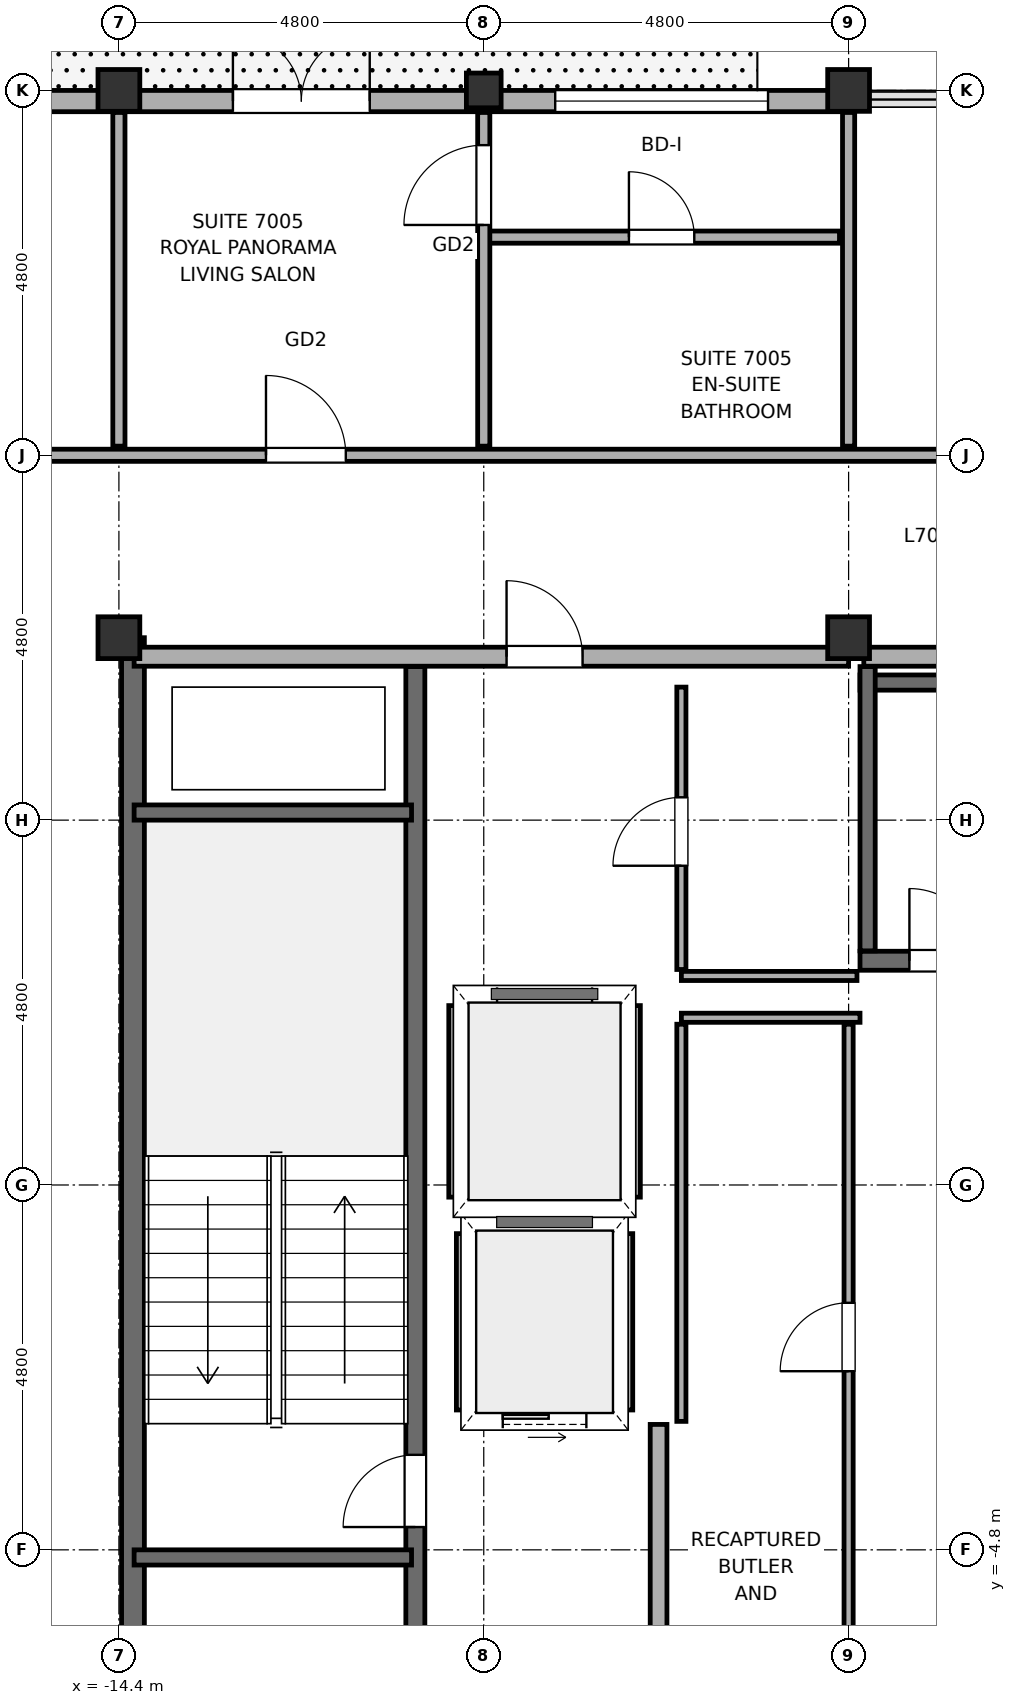
"""IFC4 building model, lengths in metres.
Left out: names, types, materials, properties, quantities, classifications, styles, units other than length and angle.
Written with IfcOpenShell. Run it as: python <this file> out.ifc"""

import sys

from ifc_helpers import new_model, si_unit, direction, frame, frame_2d, origin, origin_2d, place, context, subcontext, project, spatial, rectangle, hollow_rectangle, hollow_circle, extrude, element, fill, save


model = new_model("IFC4")
c1 = context("Model", 3, precision=1e-05, world=origin(), true_north=direction((0.0, 1.0)))
c2 = subcontext(c1, "Body", "Model", "MODEL_VIEW")
j1 = project(units=[si_unit("LENGTHUNIT", "METRE"), si_unit("PLANEANGLEUNIT", "RADIAN")], contexts=[c1])
p1 = place(None, origin())
s1 = spatial("IfcSite", under=j1, at=p1, CompositionType="ELEMENT")
p2 = place(p1, origin())
s2 = spatial("IfcBuilding", under=s1, at=p2, CompositionType="ELEMENT")
p3 = place(p2, frame((0.0, 0.0, 282.2)))
s3 = spatial("IfcBuildingStorey", under=s2, at=p3, CompositionType="ELEMENT", Elevation=282.2)
for number, where, z_axis, x_axis in (
    (1, (-14.4, 7.2, 0.0), (0.0, 0.0, 1.0), (1.0, 0.0, 0.0)),
    (2, (-14.4, 14.4, 0.0), (0.0, 0.0, 1.0), (1.0, 0.0, 0.0)),
):
    element("IfcColumn", number, at=place(p3, frame(where, z_axis=z_axis, x_axis=x_axis)), inside=s3, PredefinedType="COLUMN", context=c2, shape_type="SweptSolid", body=[
        extrude(hollow_rectangle(XDim=0.55, YDim=0.55, WallThickness=0.025, at=origin_2d()), origin(), (0.0, 0.0, 1.0), 4.2),
    ])
p4 = place(p3, frame((-9.6, 14.4, -0.2), z_axis=(0.0, 0.0, 1.0), x_axis=(1.0, 0.0, 0.0)))
e3 = element("IfcColumn", 3, at=p4, inside=s3, PredefinedType="COLUMN", context=c2, shape_type="SweptSolid", body=[
    extrude(hollow_circle(Radius=0.229, WallThickness=0.02, at=origin_2d()), origin(), (0.0, 0.0, 1.0), 4.4),
])
for number, where, z_axis, x_axis in (
    (4, (-4.8, 7.2, 0.0), (0.0, 0.0, 1.0), (1.0, 0.0, 0.0)),
    (5, (-4.8, 14.4, 0.0), (0.0, 0.0, 1.0), (1.0, 0.0, 0.0)),
):
    element("IfcColumn", number, at=place(p3, frame(where, z_axis=z_axis, x_axis=x_axis)), inside=s3, PredefinedType="COLUMN", context=c2, shape_type="SweptSolid", body=[
        extrude(hollow_rectangle(XDim=0.55, YDim=0.55, WallThickness=0.025, at=origin_2d()), origin(), (0.0, 0.0, 1.0), 4.2),
    ])
p5 = place(p3, frame((-14.215, -7.2, -0.2), z_axis=(0.0, 0.0, 1.0), x_axis=(0.0, 1.0, 0.0)))
e6 = element("IfcWall", 6, at=p5, inside=s3, PredefinedType="SHEAR", context=c2, shape_type="SweptSolid", body=[
    extrude(rectangle(XDim=14.4, YDim=0.3, at=frame_2d((7.2, 0.0))), origin(), (0.0, 0.0, 1.0), 4.2),
])
p6 = place(p3, frame((-25.2, 14.26, 0.0), z_axis=(0.0, 0.0, 1.0), x_axis=(1.0, 0.0, 0.0)))
e7 = element("IfcWall", 7, at=p6, inside=s3, PredefinedType="SOLIDWALL", context=c2, shape_type="SweptSolid", body=[
    extrude(rectangle(XDim=20.45, YDim=0.28, at=frame_2d((10.225, 0.0))), origin(), (0.0, 0.0, 1.0), 2.6),
])
p7 = place(p6, frame((12.3, 0.0, 0.0)))
e8 = element("IfcOpeningElement", 8, at=p7, cuts=e7, PredefinedType="OPENING", context=c2, shape_type="SweptSolid", body=[
    extrude(rectangle(XDim=1.8, YDim=2.2, at=frame_2d((0.9, 1.1))), frame((0.0, 0.155, 0.0), z_axis=(0.0, -1.0, 0.0), x_axis=(1.0, 0.0, 0.0)), (0.0, 0.0, 1.0), 0.31),
])
p8 = place(p6, frame((16.54, 0.0, 0.75)))
e9 = element("IfcOpeningElement", 9, at=p8, cuts=e7, PredefinedType="OPENING", context=c2, shape_type="SweptSolid", body=[
    extrude(rectangle(XDim=2.8, YDim=1.7, at=frame_2d((1.4, 0.85))), frame((0.0, 0.155, 0.0), z_axis=(0.0, -1.0, 0.0), x_axis=(1.0, 0.0, 0.0)), (0.0, 0.0, 1.0), 0.31),
])
p9 = place(p3, frame((-14.2, 6.95, 0.0), z_axis=(0.0, 0.0, 1.0), x_axis=(1.0, 0.0, 0.0)))
e10 = element("IfcWall", 10, at=p9, inside=s3, PredefinedType="SOLIDWALL", context=c2, shape_type="SweptSolid", body=[
    extrude(rectangle(XDim=9.4, YDim=0.25, at=frame_2d((4.7, 0.0))), origin(), (0.0, 0.0, 1.0), 2.6),
])
p10 = place(p9, frame((4.9, 0.0, 0.0)))
e11 = element("IfcOpeningElement", 11, at=p10, cuts=e10, PredefinedType="OPENING", context=c2, shape_type="SweptSolid", body=[
    extrude(rectangle(XDim=1.0, YDim=2.15, at=frame_2d((0.5, 1.075))), frame((0.0, 0.14, 0.0), z_axis=(0.0, -1.0, 0.0), x_axis=(1.0, 0.0, 0.0)), (0.0, 0.0, 1.0), 0.28),
])
p11 = place(p3, frame((-4.6, 6.95, 0.0), z_axis=(0.0, 0.0, 1.0), x_axis=(1.0, 0.0, 0.0)))
e12 = element("IfcWall", 12, at=p11, inside=s3, PredefinedType="SOLIDWALL", context=c2, shape_type="SweptSolid", body=[
    extrude(rectangle(XDim=9.2, YDim=0.25, at=frame_2d((4.6, 0.0))), origin(), (0.0, 0.0, 1.0), 2.6),
])
p12 = place(p3, frame((-7.3, -6.82, 0.0), z_axis=(0.0, 0.0, 1.0), x_axis=(0.0, 1.0, 0.0)))
e13 = element("IfcWall", 13, at=p12, inside=s3, PredefinedType="SOLIDWALL", context=c2, shape_type="SweptSolid", body=[
    extrude(rectangle(XDim=3.67, YDim=0.22, at=frame_2d((1.835, 0.0))), origin(), (0.0, 0.0, 1.0), 2.6),
])
p13 = place(p3, frame((-10.5, -6.82, -0.2), z_axis=(0.0, 0.0, 1.0), x_axis=(0.0, 1.0, 0.0)))
e14 = element("IfcWall", 14, at=p13, inside=s3, PredefinedType="SOLIDWALL", context=c2, shape_type="SweptSolid", body=[
    extrude(rectangle(XDim=13.64, YDim=0.25, at=frame_2d((6.82, 0.0))), origin(), (0.0, 0.0, 1.0), 4.2),
])
p14 = place(p13, frame((2.32, 0.0, 0.2)))
e15 = element("IfcOpeningElement", 15, at=p14, cuts=e14, PredefinedType="OPENING", context=c2, shape_type="SweptSolid", body=[
    extrude(rectangle(XDim=0.95, YDim=2.15, at=frame_2d((0.475, 1.075))), frame((0.0, 0.14, 0.0), z_axis=(0.0, -1.0, 0.0), x_axis=(1.0, 0.0, 0.0)), (0.0, 0.0, 1.0), 0.28),
])
for number, where, z_axis, x_axis in (
    (16, (-14.2, -4.9, -0.2), (0.0, 0.0, 1.0), (1.0, 0.0, 0.0)),
    (17, (-14.2, 4.9, -0.2), (0.0, 0.0, 1.0), (1.0, 0.0, 0.0)),
):
    element("IfcWall", number, at=place(p3, frame(where, z_axis=z_axis, x_axis=x_axis)), inside=s3, PredefinedType="SOLIDWALL", context=c2, shape_type="SweptSolid", body=[
        extrude(rectangle(XDim=3.65, YDim=0.2, at=frame_2d((1.825, 0.0))), origin(), (0.0, 0.0, 1.0), 4.2),
    ])
p15 = place(p3, frame((-4.65, 2.95, -0.2), z_axis=(0.0, 0.0, 1.0), x_axis=(1.0, 0.0, 0.0)))
e18 = element("IfcWall", 18, at=p15, inside=s3, PredefinedType="SOLIDWALL", context=c2, shape_type="SweptSolid", body=[
    extrude(rectangle(XDim=9.9, YDim=0.25, at=frame_2d((4.95, 0.0))), origin(), (0.0, 0.0, 1.0), 4.2),
])
p16 = place(p15, frame((0.65, 0.0, 0.2)))
e19 = element("IfcOpeningElement", 19, at=p16, cuts=e18, PredefinedType="OPENING", context=c2, shape_type="SweptSolid", body=[
    extrude(rectangle(XDim=0.95, YDim=2.15, at=frame_2d((0.475, 1.075))), frame((0.0, 0.14, 0.0), z_axis=(0.0, -1.0, 0.0), x_axis=(1.0, 0.0, 0.0)), (0.0, 0.0, 1.0), 0.28),
])
p17 = place(p3, frame((-4.65, 6.61, -0.2), z_axis=(0.0, 0.0, 1.0), x_axis=(1.0, 0.0, 0.0)))
e20 = element("IfcWall", 20, at=p17, inside=s3, PredefinedType="SOLIDWALL", context=c2, shape_type="SweptSolid", body=[
    extrude(rectangle(XDim=9.9, YDim=0.2, at=frame_2d((4.95, 0.0))), origin(), (0.0, 0.0, 1.0), 4.2),
])
p18 = place(p3, frame((-4.55, 3.08, -0.2), z_axis=(0.0, 0.0, 1.0), x_axis=(0.0, 1.0, 0.0)))
e21 = element("IfcWall", 21, at=p18, inside=s3, PredefinedType="SOLIDWALL", context=c2, shape_type="SweptSolid", body=[
    extrude(rectangle(XDim=3.74, YDim=0.2, at=frame_2d((1.87, 0.0))), origin(), (0.0, 0.0, 1.0), 4.2),
])
p19 = place(p3, frame((-9.82, -3.1, 0.0), z_axis=(0.0, 0.0, 1.0), x_axis=(1.0, 0.0, 0.0)))
e22 = element("IfcWall", 22, at=p19, inside=s3, PredefinedType="SOLIDWALL", context=c2, shape_type="SweptSolid", body=[
    extrude(rectangle(XDim=2.04, YDim=0.2, at=frame_2d((1.02, 0.0))), origin(), (0.0, 0.0, 1.0), 4.0),
])
p20 = place(p19, frame((0.47, 0.0, 0.0)))
e23 = element("IfcOpeningElement", 23, at=p20, cuts=e22, PredefinedType="OPENING", context=c2, shape_type="SweptSolid", body=[
    extrude(rectangle(XDim=1.1, YDim=2.2, at=frame_2d((0.55, 1.1))), frame((0.0, 0.115, 0.0), z_axis=(0.0, -1.0, 0.0), x_axis=(1.0, 0.0, 0.0)), (0.0, 0.0, 1.0), 0.23),
])
p21 = place(p3, frame((-9.82, -0.5, 0.0), z_axis=(0.0, 0.0, 1.0), x_axis=(1.0, 0.0, 0.0)))
e24 = element("IfcWall", 24, at=p21, inside=s3, PredefinedType="SOLIDWALL", context=c2, shape_type="SweptSolid", body=[
    extrude(rectangle(XDim=2.04, YDim=0.2, at=frame_2d((1.02, 0.0))), origin(), (0.0, 0.0, 1.0), 4.0),
])
for number, where, z_axis, x_axis in (
    (25, (-9.9, -2.96, 0.0), (0.0, 0.0, 1.0), (0.0, 1.0, 0.0)),
    (26, (-7.7, -2.96, 0.0), (0.0, 0.0, 1.0), (0.0, 1.0, 0.0)),
):
    element("IfcWall", number, at=place(p3, frame(where, z_axis=z_axis, x_axis=x_axis)), inside=s3, PredefinedType="PARTITIONING", context=c2, shape_type="SweptSolid", body=[
        extrude(rectangle(XDim=2.32, YDim=0.12, at=frame_2d((1.16, 0.0))), origin(), (0.0, 0.0, 1.0), 4.0),
    ])
p22 = place(p3, frame((-9.92, 2.5, 0.0), z_axis=(0.0, 0.0, 1.0), x_axis=(1.0, 0.0, 0.0)))
e27 = element("IfcWall", 27, at=p22, inside=s3, PredefinedType="SOLIDWALL", context=c2, shape_type="SweptSolid", body=[
    extrude(rectangle(XDim=2.24, YDim=0.2, at=frame_2d((1.12, 0.0))), origin(), (0.0, 0.0, 1.0), 4.0),
])
p23 = place(p22, frame((0.495, 0.0, 0.0)))
e28 = element("IfcOpeningElement", 28, at=p23, cuts=e27, PredefinedType="OPENING", context=c2, shape_type="SweptSolid", body=[
    extrude(rectangle(XDim=1.25, YDim=2.25, at=frame_2d((0.625, 1.125))), frame((0.0, 0.115, 0.0), z_axis=(0.0, -1.0, 0.0), x_axis=(1.0, 0.0, 0.0)), (0.0, 0.0, 1.0), 0.23),
])
p24 = place(p3, frame((-9.92, -0.3, 0.0), z_axis=(0.0, 0.0, 1.0), x_axis=(1.0, 0.0, 0.0)))
e29 = element("IfcWall", 29, at=p24, inside=s3, PredefinedType="SOLIDWALL", context=c2, shape_type="SweptSolid", body=[
    extrude(rectangle(XDim=2.24, YDim=0.2, at=frame_2d((1.12, 0.0))), origin(), (0.0, 0.0, 1.0), 4.0),
])
for number, where, z_axis, x_axis in (
    (30, (-10.0, -0.16, 0.0), (0.0, 0.0, 1.0), (0.0, 1.0, 0.0)),
    (31, (-7.6, -0.16, 0.0), (0.0, 0.0, 1.0), (0.0, 1.0, 0.0)),
):
    element("IfcWall", number, at=place(p3, frame(where, z_axis=z_axis, x_axis=x_axis)), inside=s3, PredefinedType="PARTITIONING", context=c2, shape_type="SweptSolid", body=[
        extrude(rectangle(XDim=2.52, YDim=0.12, at=frame_2d((1.26, 0.0))), origin(), (0.0, 0.0, 1.0), 4.0),
    ])
p25 = place(p3, frame((-7.0, 2.2, 0.0), z_axis=(0.0, 0.0, 1.0), x_axis=(1.0, 0.0, 0.0)))
e32 = element("IfcWall", 32, at=p25, inside=s3, PredefinedType="PARTITIONING", context=c2, shape_type="SweptSolid", body=[
    extrude(rectangle(XDim=2.35, YDim=0.12, at=frame_2d((1.175, 0.0))), origin(), (0.0, 0.0, 1.0), 4.0),
])
p26 = place(p3, frame((-7.0, 2.75, 0.0), z_axis=(0.0, 0.0, 1.0), x_axis=(1.0, 0.0, 0.0)))
e33 = element("IfcWall", 33, at=p26, inside=s3, PredefinedType="PARTITIONING", context=c2, shape_type="SweptSolid", body=[
    extrude(rectangle(XDim=2.31, YDim=0.12, at=frame_2d((1.155, 0.0))), origin(), (0.0, 0.0, 1.0), 4.0),
])
p27 = place(p3, frame((-23.88, 9.6, 0.0), z_axis=(0.0, 0.0, 1.0), x_axis=(1.0, 0.0, 0.0)))
e34 = element("IfcWall", 34, at=p27, inside=s3, PredefinedType="PARTITIONING", context=c2, shape_type="SweptSolid", body=[
    extrude(rectangle(XDim=42.96, YDim=0.16, at=frame_2d((21.48, 0.0))), origin(), (0.0, 0.0, 1.0), 2.6),
])
p28 = place(p27, frame((4.23, 0.0, 0.0)))
e35 = element("IfcOpeningElement", 35, at=p28, cuts=e34, PredefinedType="OPENING", context=c2, shape_type="SweptSolid", body=[
    extrude(rectangle(XDim=0.9, YDim=2.1, at=frame_2d((0.45, 1.05))), frame((0.0, 0.095, 0.0), z_axis=(0.0, -1.0, 0.0), x_axis=(1.0, 0.0, 0.0)), (0.0, 0.0, 1.0), 0.19),
])
p29 = place(p27, frame((11.415, 0.0, 0.0)))
e36 = element("IfcOpeningElement", 36, at=p29, cuts=e34, PredefinedType="OPENING", context=c2, shape_type="SweptSolid", body=[
    extrude(rectangle(XDim=1.05, YDim=2.2, at=frame_2d((0.525, 1.1))), frame((0.0, 0.095, 0.0), z_axis=(0.0, -1.0, 0.0), x_axis=(1.0, 0.0, 0.0)), (0.0, 0.0, 1.0), 0.19),
])
p30 = place(p27, frame((30.63, 0.0, 0.0)))
e37 = element("IfcOpeningElement", 37, at=p30, cuts=e34, PredefinedType="OPENING", context=c2, shape_type="SweptSolid", body=[
    extrude(rectangle(XDim=0.9, YDim=2.1, at=frame_2d((0.45, 1.05))), frame((0.0, 0.095, 0.0), z_axis=(0.0, -1.0, 0.0), x_axis=(1.0, 0.0, 0.0)), (0.0, 0.0, 1.0), 0.19),
])
p31 = place(p3, frame((-9.6, 12.47, 0.0), z_axis=(0.0, 0.0, 1.0), x_axis=(1.0, 0.0, 0.0)))
e38 = element("IfcWall", 38, at=p31, inside=s3, PredefinedType="PARTITIONING", context=c2, shape_type="SweptSolid", body=[
    extrude(rectangle(XDim=4.68, YDim=0.16, at=frame_2d((2.34, 0.0))), origin(), (0.0, 0.0, 1.0), 3.56),
])
p32 = place(p31, frame((1.91, 0.0, 0.0)))
e39 = element("IfcOpeningElement", 39, at=p32, cuts=e38, PredefinedType="OPENING", context=c2, shape_type="SweptSolid", body=[
    extrude(rectangle(XDim=0.86, YDim=2.1, at=frame_2d((0.43, 1.05))), frame((0.0, 0.095, 0.0), z_axis=(0.0, -1.0, 0.0), x_axis=(1.0, 0.0, 0.0)), (0.0, 0.0, 1.0), 0.19),
])
p33 = place(p3, frame((-14.4, 9.72, 0.0), z_axis=(0.0, 0.0, 1.0), x_axis=(0.0, 1.0, 0.0)))
e40 = element("IfcWall", 40, at=p33, inside=s3, PredefinedType="PARTITIONING", context=c2, shape_type="SweptSolid", body=[
    extrude(rectangle(XDim=4.39, YDim=0.16, at=frame_2d((2.195, 0.0))), origin(), (0.0, 0.0, 1.0), 2.6),
])
p34 = place(p3, frame((-9.6, 9.72, 0.0), z_axis=(0.0, 0.0, 1.0), x_axis=(0.0, 1.0, 0.0)))
e41 = element("IfcWall", 41, at=p34, inside=s3, PredefinedType="PARTITIONING", context=c2, shape_type="SweptSolid", body=[
    extrude(rectangle(XDim=4.39, YDim=0.16, at=frame_2d((2.195, 0.0))), origin(), (0.0, 0.0, 1.0), 2.6),
])
p35 = place(p34, frame((2.91, 0.0, 0.0)))
e42 = element("IfcOpeningElement", 42, at=p35, cuts=e41, PredefinedType="OPENING", context=c2, shape_type="SweptSolid", body=[
    extrude(rectangle(XDim=1.05, YDim=2.2, at=frame_2d((0.525, 1.1))), frame((0.0, 0.095, 0.0), z_axis=(0.0, -1.0, 0.0), x_axis=(1.0, 0.0, 0.0)), (0.0, 0.0, 1.0), 0.19),
])
p36 = place(p3, frame((-7.0, -3.11, 0.0), z_axis=(0.0, 0.0, 1.0), x_axis=(0.0, 1.0, 0.0)))
e43 = element("IfcWall", 43, at=p36, inside=s3, PredefinedType="PARTITIONING", context=c2, shape_type="SweptSolid", body=[
    extrude(rectangle(XDim=5.225, YDim=0.12, at=frame_2d((2.613, 0.0))), origin(), (0.0, 0.0, 1.0), 4.0),
])
p37 = place(p3, frame((-7.0, 2.835, 0.0), z_axis=(0.0, 0.0, 1.0), x_axis=(0.0, 1.0, 0.0)))
e44 = element("IfcWall", 44, at=p37, inside=s3, PredefinedType="PARTITIONING", context=c2, shape_type="SweptSolid", body=[
    extrude(rectangle(XDim=3.715, YDim=0.12, at=frame_2d((1.857, 0.0))), origin(), (0.0, 0.0, 1.0), 4.0),
])
p38 = place(p37, frame((1.365, 0.0, 0.0)))
e45 = element("IfcOpeningElement", 45, at=p38, cuts=e44, PredefinedType="OPENING", context=c2, shape_type="SweptSolid", body=[
    extrude(rectangle(XDim=0.9, YDim=2.1, at=frame_2d((0.45, 1.05))), frame((0.0, 0.075, 0.0), z_axis=(0.0, -1.0, 0.0), x_axis=(1.0, 0.0, 0.0)), (0.0, 0.0, 1.0), 0.15),
])
p39 = place(p3, frame((-4.8, -6.415, 0.0), z_axis=(0.0, 0.0, 1.0), x_axis=(0.0, 1.0, 0.0)))
e46 = element("IfcWall", 46, at=p39, inside=s3, PredefinedType="PARTITIONING", context=c2, shape_type="SweptSolid", body=[
    extrude(rectangle(XDim=8.53, YDim=0.12, at=frame_2d((4.265, 0.0))), origin(), (0.0, 0.0, 1.0), 4.0),
])
p40 = place(p39, frame((3.965, 0.0, 0.0)))
e47 = element("IfcOpeningElement", 47, at=p40, cuts=e46, PredefinedType="OPENING", context=c2, shape_type="SweptSolid", body=[
    extrude(rectangle(XDim=0.9, YDim=2.1, at=frame_2d((0.45, 1.05))), frame((0.0, 0.075, 0.0), z_axis=(0.0, -1.0, 0.0), x_axis=(1.0, 0.0, 0.0)), (0.0, 0.0, 1.0), 0.15),
])
p41 = place(p3, frame((-4.8, 9.72, 0.0), z_axis=(0.0, 0.0, 1.0), x_axis=(0.0, 1.0, 0.0)))
e48 = element("IfcWall", 48, at=p41, inside=s3, PredefinedType="PARTITIONING", context=c2, shape_type="SweptSolid", body=[
    extrude(rectangle(XDim=4.39, YDim=0.16, at=frame_2d((2.195, 0.0))), origin(), (0.0, 0.0, 1.0), 2.6),
])
p42 = place(p7, origin())
e49 = element("IfcDoor", 49, at=p42, inside=s3, OperationType="DOUBLE_DOOR_SINGLE_SWING", PredefinedType="DOOR", context=c2, shape_type="SweptSolid", body=[
    extrude(rectangle(XDim=1.8, YDim=2.2, at=frame_2d((0.9, 1.1))), frame((0.0, 0.025, 0.0), z_axis=(0.0, -1.0, 0.0), x_axis=(1.0, 0.0, 0.0)), (0.0, 0.0, 1.0), 0.05),
])
fill(e8, e49)
p43 = place(p8, origin())
e50 = element("IfcWindow", 50, at=p43, inside=s3, PartitioningType="SINGLE_PANEL", PredefinedType="WINDOW", context=c2, shape_type="SweptSolid", body=[
    extrude(rectangle(XDim=2.8, YDim=1.7, at=frame_2d((1.4, 0.85))), frame((0.0, 0.03, 0.0), z_axis=(0.0, -1.0, 0.0), x_axis=(1.0, 0.0, 0.0)), (0.0, 0.0, 1.0), 0.06),
])
fill(e9, e50)
p44 = place(p10, origin())
e51 = element("IfcDoor", 51, at=p44, inside=s3, OperationType="SINGLE_SWING_RIGHT", PredefinedType="DOOR", context=c2, shape_type="SweptSolid", body=[
    extrude(rectangle(XDim=1.0, YDim=2.15, at=frame_2d((0.5, 1.075))), frame((0.0, 0.025, 0.0), z_axis=(0.0, -1.0, 0.0), x_axis=(1.0, 0.0, 0.0)), (0.0, 0.0, 1.0), 0.05),
])
fill(e11, e51)
p45 = place(p14, origin())
e52 = element("IfcDoor", 52, at=p45, inside=s3, OperationType="SINGLE_SWING_LEFT", PredefinedType="DOOR", context=c2, shape_type="SweptSolid", body=[
    extrude(rectangle(XDim=0.95, YDim=2.15, at=frame_2d((0.475, 1.075))), frame((0.0, 0.025, 0.0), z_axis=(0.0, -1.0, 0.0), x_axis=(1.0, 0.0, 0.0)), (0.0, 0.0, 1.0), 0.05),
])
fill(e15, e52)
p46 = place(p16, origin())
e53 = element("IfcDoor", 53, at=p46, inside=s3, OperationType="SINGLE_SWING_RIGHT", PredefinedType="DOOR", context=c2, shape_type="SweptSolid", body=[
    extrude(rectangle(XDim=0.95, YDim=2.15, at=frame_2d((0.475, 1.075))), frame((0.0, 0.025, 0.0), z_axis=(0.0, -1.0, 0.0), x_axis=(1.0, 0.0, 0.0)), (0.0, 0.0, 1.0), 0.05),
])
fill(e19, e53)
p47 = place(p20, origin())
e54 = element("IfcDoor", 54, at=p47, inside=s3, OperationType="SLIDING_TO_LEFT", PredefinedType="DOOR", context=c2, shape_type="SweptSolid", body=[
    extrude(rectangle(XDim=1.1, YDim=2.2, at=frame_2d((0.55, 1.1))), frame((0.0, 0.025, 0.0), z_axis=(0.0, -1.0, 0.0), x_axis=(1.0, 0.0, 0.0)), (0.0, 0.0, 1.0), 0.05),
])
fill(e23, e54)
p48 = place(p23, origin())
e55 = element("IfcDoor", 55, at=p48, inside=s3, OperationType="SLIDING_TO_LEFT", PredefinedType="DOOR", context=c2, shape_type="SweptSolid", body=[
    extrude(rectangle(XDim=1.25, YDim=2.25, at=frame_2d((0.625, 1.125))), frame((0.0, 0.025, 0.0), z_axis=(0.0, -1.0, 0.0), x_axis=(1.0, 0.0, 0.0)), (0.0, 0.0, 1.0), 0.05),
])
fill(e28, e55)
p49 = place(p40, origin())
e56 = element("IfcDoor", 56, at=p49, inside=s3, OperationType="SINGLE_SWING_LEFT", PredefinedType="DOOR", context=c2, shape_type="SweptSolid", body=[
    extrude(rectangle(XDim=0.9, YDim=2.1, at=frame_2d((0.45, 1.05))), frame((0.0, 0.025, 0.0), z_axis=(0.0, -1.0, 0.0), x_axis=(1.0, 0.0, 0.0)), (0.0, 0.0, 1.0), 0.05),
])
fill(e47, e56)
p50 = place(p38, origin())
e57 = element("IfcDoor", 57, at=p50, inside=s3, OperationType="SINGLE_SWING_RIGHT", PredefinedType="DOOR", context=c2, shape_type="SweptSolid", body=[
    extrude(rectangle(XDim=0.9, YDim=2.1, at=frame_2d((0.45, 1.05))), frame((0.0, 0.025, 0.0), z_axis=(0.0, -1.0, 0.0), x_axis=(1.0, 0.0, 0.0)), (0.0, 0.0, 1.0), 0.05),
])
fill(e45, e57)
p51 = place(p29, origin())
e58 = element("IfcDoor", 58, at=p51, inside=s3, OperationType="SINGLE_SWING_RIGHT", PredefinedType="DOOR", context=c2, shape_type="SweptSolid", body=[
    extrude(rectangle(XDim=1.05, YDim=2.2, at=frame_2d((0.525, 1.1))), frame((0.0, 0.025, 0.0), z_axis=(0.0, -1.0, 0.0), x_axis=(1.0, 0.0, 0.0)), (0.0, 0.0, 1.0), 0.05),
])
fill(e36, e58)
p52 = place(p35, origin())
e59 = element("IfcDoor", 59, at=p52, inside=s3, OperationType="SINGLE_SWING_LEFT", PredefinedType="DOOR", context=c2, shape_type="SweptSolid", body=[
    extrude(rectangle(XDim=1.05, YDim=2.2, at=frame_2d((0.525, 1.1))), frame((0.0, 0.025, 0.0), z_axis=(0.0, -1.0, 0.0), x_axis=(1.0, 0.0, 0.0)), (0.0, 0.0, 1.0), 0.05),
])
fill(e42, e59)
p53 = place(p32, origin())
e60 = element("IfcDoor", 60, at=p53, inside=s3, OperationType="SINGLE_SWING_RIGHT", PredefinedType="DOOR", context=c2, shape_type="SweptSolid", body=[
    extrude(rectangle(XDim=0.86, YDim=2.1, at=frame_2d((0.43, 1.05))), frame((0.0, 0.025, 0.0), z_axis=(0.0, -1.0, 0.0), x_axis=(1.0, 0.0, 0.0)), (0.0, 0.0, 1.0), 0.05),
])
fill(e39, e60)
save(model, sys.argv[1])
